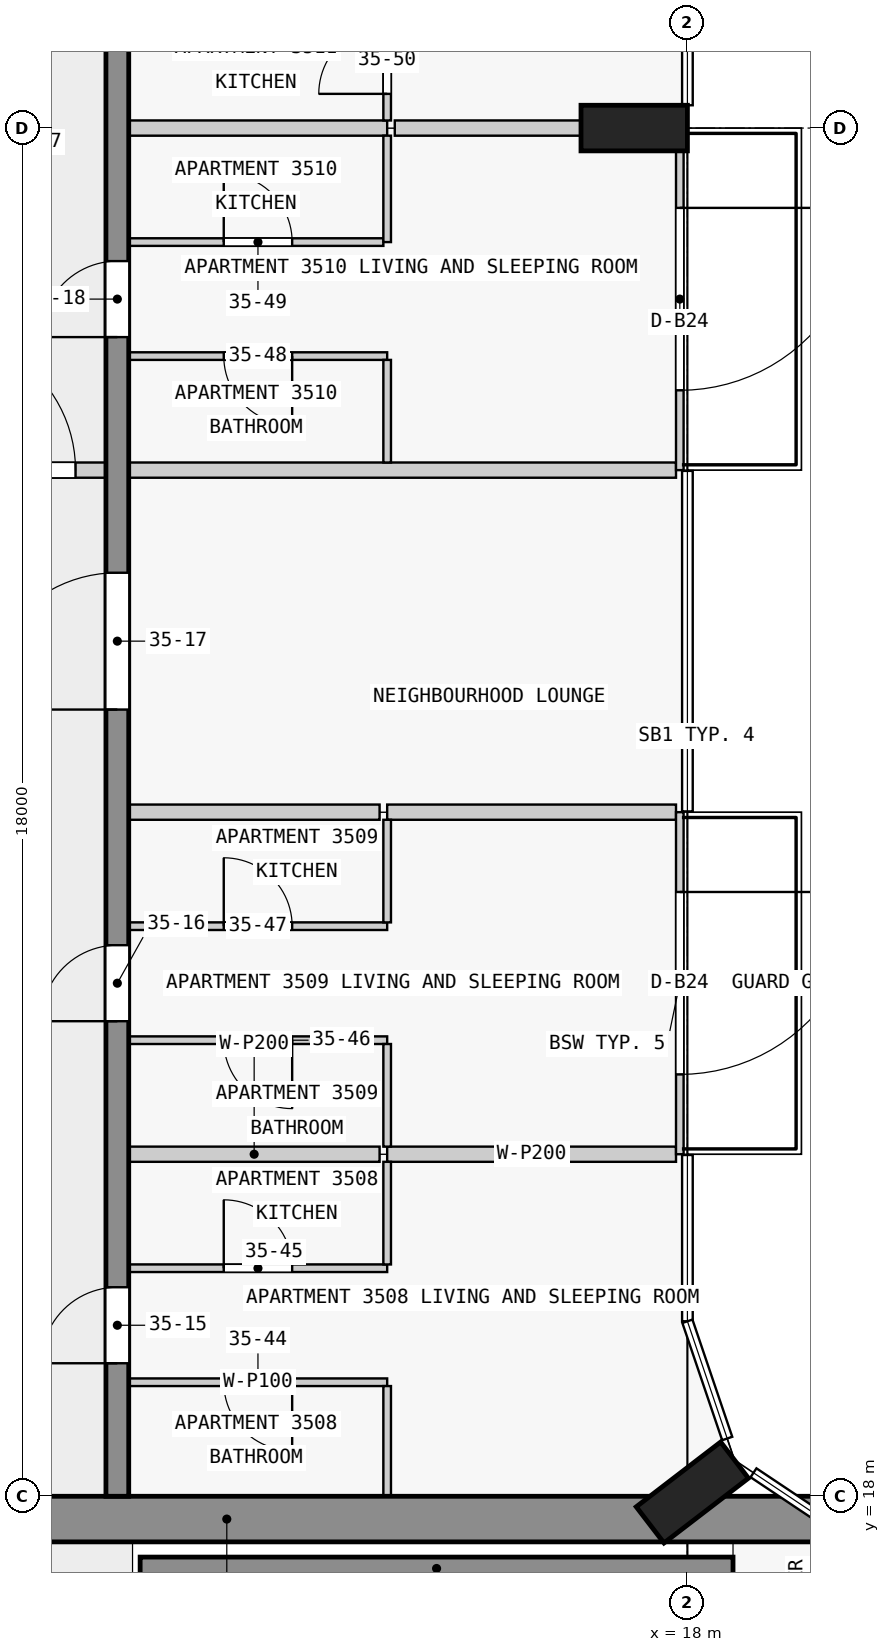
"""IFC4 building model, lengths in metres.
Left out: names, types, materials, properties, quantities, classifications, styles, units other than length and angle.
Written with IfcOpenShell. Run it as: python <this file> out.ifc"""

import sys

from ifc_helpers import new_model, si_unit, direction, frame, frame_2d, origin, origin_2d, place, context, subcontext, project, spatial, rectangle, extrude, element, fill, save


model = new_model("IFC4")
c1 = context("Model", 3, precision=1e-05, world=origin(), true_north=direction((0.0, 1.0)))
c2 = subcontext(c1, "Body", "Model", "MODEL_VIEW")
j1 = project(units=[si_unit("LENGTHUNIT", "METRE"), si_unit("PLANEANGLEUNIT", "RADIAN")], contexts=[c1])
p1 = place(None, origin())
s1 = spatial("IfcSite", under=j1, at=p1, CompositionType="ELEMENT")
p2 = place(p1, origin())
s2 = spatial("IfcBuilding", under=s1, at=p2, CompositionType="ELEMENT")
p3 = place(p2, frame((0.0, 0.0, 139.4)))
s3 = spatial("IfcBuildingStorey", under=s2, at=p3, CompositionType="ELEMENT", Elevation=139.4)
for number, where, z_axis, x_axis in (
    (1, (18.065, 18.05, 0.0), (0.0, 0.0, 1.0), (-0.609, 0.793, 0.0)),
    (2, (17.3, 36.0, 0.0), (0.0, 0.0, 1.0), (0.0, 1.0, 0.0)),
):
    element("IfcColumn", number, at=place(p3, frame(where, z_axis=z_axis, x_axis=x_axis)), inside=s3, PredefinedType="COLUMN", context=c2, shape_type="SweptSolid", body=[
        extrude(rectangle(XDim=0.6, YDim=1.4, at=origin_2d()), origin(), (0.0, 0.0, 1.0), 3.5),
    ])
p4 = place(p3, frame((1.38, 17.7, 0.0), z_axis=(0.0, 0.0, 1.0), x_axis=(1.0, 0.0, 0.0)))
e3 = element("IfcWall", 3, at=p4, inside=s3, PredefinedType="SHEAR", context=c2, shape_type="SweptSolid", body=[
    extrude(rectangle(XDim=21.12, YDim=0.6, at=frame_2d((10.56, 0.0))), origin(), (0.0, 0.0, 1.0), 3.25),
])
p5 = place(p4, frame((6.4, 0.0, 0.0)))
e4 = element("IfcOpeningElement", 4, at=p5, cuts=e3, PredefinedType="OPENING", context=c2, shape_type="SweptSolid", body=[
    extrude(rectangle(XDim=1.8, YDim=2.1, at=frame_2d((0.9, 1.05))), frame((0.0, 0.31, 0.0), z_axis=(0.0, -1.0, 0.0), x_axis=(1.0, 0.0, 0.0)), (0.0, 0.0, 1.0), 0.62),
])
p6 = place(p3, frame((10.8, 17.05, 0.0), z_axis=(0.0, 0.0, 1.0), x_axis=(1.0, 0.0, 0.0)))
e5 = element("IfcWall", 5, at=p6, inside=s3, PredefinedType="SHEAR", context=c2, shape_type="SweptSolid", body=[
    extrude(rectangle(XDim=7.8, YDim=0.3, at=frame_2d((3.9, 0.0))), origin(), (0.0, 0.0, 1.0), 3.25),
])
p7 = place(p3, frame((10.5, 18.0, 0.0), z_axis=(0.0, 0.0, 1.0), x_axis=(0.0, 1.0, 0.0)))
e6 = element("IfcWall", 6, at=p7, inside=s3, PredefinedType="SHEAR", context=c2, shape_type="SweptSolid", body=[
    extrude(rectangle(XDim=27.0, YDim=0.3, at=frame_2d((13.5, 0.0))), origin(), (0.0, 0.0, 1.0), 3.25),
])
p8 = place(p7, frame((1.75, 0.0, 0.0)))
e7 = element("IfcOpeningElement", 7, at=p8, cuts=e6, PredefinedType="OPENING", context=c2, shape_type="SweptSolid", body=[
    extrude(rectangle(XDim=1.0, YDim=2.1, at=frame_2d((0.5, 1.05))), frame((0.0, 0.16, 0.0), z_axis=(0.0, -1.0, 0.0), x_axis=(1.0, 0.0, 0.0)), (0.0, 0.0, 1.0), 0.32),
])
p9 = place(p7, frame((6.25, 0.0, 0.0)))
e8 = element("IfcOpeningElement", 8, at=p9, cuts=e6, PredefinedType="OPENING", context=c2, shape_type="SweptSolid", body=[
    extrude(rectangle(XDim=1.0, YDim=2.1, at=frame_2d((0.5, 1.05))), frame((0.0, 0.16, 0.0), z_axis=(0.0, -1.0, 0.0), x_axis=(1.0, 0.0, 0.0)), (0.0, 0.0, 1.0), 0.32),
])
p10 = place(p7, frame((10.35, 0.0, 0.0)))
e9 = element("IfcOpeningElement", 9, at=p10, cuts=e6, PredefinedType="OPENING", context=c2, shape_type="SweptSolid", body=[
    extrude(rectangle(XDim=1.8, YDim=2.1, at=frame_2d((0.9, 1.05))), frame((0.0, 0.16, 0.0), z_axis=(0.0, -1.0, 0.0), x_axis=(1.0, 0.0, 0.0)), (0.0, 0.0, 1.0), 0.32),
])
p11 = place(p7, frame((15.25, 0.0, 0.0)))
e10 = element("IfcOpeningElement", 10, at=p11, cuts=e6, PredefinedType="OPENING", context=c2, shape_type="SweptSolid", body=[
    extrude(rectangle(XDim=1.0, YDim=2.1, at=frame_2d((0.5, 1.05))), frame((0.0, 0.16, 0.0), z_axis=(0.0, -1.0, 0.0), x_axis=(1.0, 0.0, 0.0)), (0.0, 0.0, 1.0), 0.32),
])
p12 = place(p7, frame((21.35, 0.0, 0.0)))
e11 = element("IfcOpeningElement", 11, at=p12, cuts=e6, PredefinedType="OPENING", context=c2, shape_type="SweptSolid", body=[
    extrude(rectangle(XDim=1.0, YDim=2.1, at=frame_2d((0.5, 1.05))), frame((0.0, 0.16, 0.0), z_axis=(0.0, -1.0, 0.0), x_axis=(1.0, 0.0, 0.0)), (0.0, 0.0, 1.0), 0.32),
])
p13 = place(p3, frame((17.9, 27.0, 0.0), z_axis=(0.0, 0.0, 1.0), x_axis=(0.0, -1.0, 0.0)))
e12 = element("IfcWall", 12, at=p13, inside=s3, PredefinedType="STANDARD", context=c2, shape_type="SweptSolid", body=[
    extrude(rectangle(XDim=4.5, YDim=0.1, at=frame_2d((2.25, 0.0))), origin(), (0.0, 0.0, 1.0), 3.25),
])
p14 = place(p13, frame((1.05, 0.0, 0.0)))
e13 = element("IfcOpeningElement", 13, at=p14, cuts=e12, PredefinedType="OPENING", context=c2, shape_type="SweptSolid", body=[
    extrude(rectangle(XDim=2.4, YDim=2.4, at=frame_2d((1.2, 1.2))), frame((0.0, 0.06, 0.0), z_axis=(0.0, -1.0, 0.0), x_axis=(1.0, 0.0, 0.0)), (0.0, 0.0, 1.0), 0.12),
])
p15 = place(p3, frame((17.9, 36.0, 0.0), z_axis=(0.0, 0.0, 1.0), x_axis=(0.0, -1.0, 0.0)))
e14 = element("IfcWall", 14, at=p15, inside=s3, PredefinedType="STANDARD", context=c2, shape_type="SweptSolid", body=[
    extrude(rectangle(XDim=4.5, YDim=0.1, at=frame_2d((2.25, 0.0))), origin(), (0.0, 0.0, 1.0), 3.25),
])
p16 = place(p15, frame((1.05, 0.0, 0.0)))
e15 = element("IfcOpeningElement", 15, at=p16, cuts=e14, PredefinedType="OPENING", context=c2, shape_type="SweptSolid", body=[
    extrude(rectangle(XDim=2.4, YDim=2.4, at=frame_2d((1.2, 1.2))), frame((0.0, 0.06, 0.0), z_axis=(0.0, -1.0, 0.0), x_axis=(1.0, 0.0, 0.0)), (0.0, 0.0, 1.0), 0.12),
])
p17 = place(p3, frame((14.05, 19.5, 0.0), z_axis=(0.0, 0.0, 1.0), x_axis=(-1.0, 0.0, 0.0)))
e16 = element("IfcWall", 16, at=p17, inside=s3, PredefinedType="PARTITIONING", context=c2, shape_type="SweptSolid", body=[
    extrude(rectangle(XDim=3.4, YDim=0.1, at=frame_2d((1.7, 0.0))), origin(), (0.0, 0.0, 1.0), 3.25),
])
p18 = place(p17, frame((1.25, 0.0, 0.0)))
e17 = element("IfcOpeningElement", 17, at=p18, cuts=e16, PredefinedType="OPENING", context=c2, shape_type="SweptSolid", body=[
    extrude(rectangle(XDim=0.9, YDim=2.1, at=frame_2d((0.45, 1.05))), frame((0.0, 0.06, 0.0), z_axis=(0.0, -1.0, 0.0), x_axis=(1.0, 0.0, 0.0)), (0.0, 0.0, 1.0), 0.12),
])
p19 = place(p3, frame((10.65, 21.0, 0.0), z_axis=(0.0, 0.0, 1.0), x_axis=(1.0, 0.0, 0.0)))
e18 = element("IfcWall", 18, at=p19, inside=s3, PredefinedType="PARTITIONING", context=c2, shape_type="SweptSolid", body=[
    extrude(rectangle(XDim=3.4, YDim=0.1, at=frame_2d((1.7, 0.0))), origin(), (0.0, 0.0, 1.0), 3.25),
])
p20 = place(p19, frame((1.25, 0.0, 0.0)))
e19 = element("IfcOpeningElement", 19, at=p20, cuts=e18, PredefinedType="OPENING", context=c2, shape_type="SweptSolid", body=[
    extrude(rectangle(XDim=0.9, YDim=2.1, at=frame_2d((0.45, 1.05))), frame((0.0, 0.06, 0.0), z_axis=(0.0, -1.0, 0.0), x_axis=(1.0, 0.0, 0.0)), (0.0, 0.0, 1.0), 0.12),
])
p21 = place(p3, frame((13.95, 22.5, 0.0), z_axis=(0.0, 0.0, 1.0), x_axis=(-1.0, 0.0, 0.0)))
e20 = element("IfcWall", 20, at=p21, inside=s3, PredefinedType="PARTITIONING", context=c2, shape_type="SweptSolid", body=[
    extrude(rectangle(XDim=3.3, YDim=0.2, at=frame_2d((1.65, 0.0))), origin(), (0.0, 0.0, 1.0), 3.25),
])
p22 = place(p3, frame((14.05, 22.5, 0.0), z_axis=(0.0, 0.0, 1.0), x_axis=(1.0, 0.0, 0.0)))
e21 = element("IfcWall", 21, at=p22, inside=s3, PredefinedType="PARTITIONING", context=c2, shape_type="SweptSolid", body=[
    extrude(rectangle(XDim=3.8, YDim=0.2, at=frame_2d((1.9, 0.0))), origin(), (0.0, 0.0, 1.0), 3.25),
])
p23 = place(p3, frame((14.05, 24.0, 0.0), z_axis=(0.0, 0.0, 1.0), x_axis=(-1.0, 0.0, 0.0)))
e22 = element("IfcWall", 22, at=p23, inside=s3, PredefinedType="PARTITIONING", context=c2, shape_type="SweptSolid", body=[
    extrude(rectangle(XDim=3.4, YDim=0.1, at=frame_2d((1.7, 0.0))), origin(), (0.0, 0.0, 1.0), 3.25),
])
p24 = place(p23, frame((1.25, 0.0, 0.0)))
e23 = element("IfcOpeningElement", 23, at=p24, cuts=e22, PredefinedType="OPENING", context=c2, shape_type="SweptSolid", body=[
    extrude(rectangle(XDim=0.9, YDim=2.1, at=frame_2d((0.45, 1.05))), frame((0.0, 0.06, 0.0), z_axis=(0.0, -1.0, 0.0), x_axis=(1.0, 0.0, 0.0)), (0.0, 0.0, 1.0), 0.12),
])
p25 = place(p3, frame((10.65, 25.5, 0.0), z_axis=(0.0, 0.0, 1.0), x_axis=(1.0, 0.0, 0.0)))
e24 = element("IfcWall", 24, at=p25, inside=s3, PredefinedType="PARTITIONING", context=c2, shape_type="SweptSolid", body=[
    extrude(rectangle(XDim=3.4, YDim=0.1, at=frame_2d((1.7, 0.0))), origin(), (0.0, 0.0, 1.0), 3.25),
])
p26 = place(p25, frame((1.25, 0.0, 0.0)))
e25 = element("IfcOpeningElement", 25, at=p26, cuts=e24, PredefinedType="OPENING", context=c2, shape_type="SweptSolid", body=[
    extrude(rectangle(XDim=0.9, YDim=2.1, at=frame_2d((0.45, 1.05))), frame((0.0, 0.06, 0.0), z_axis=(0.0, -1.0, 0.0), x_axis=(1.0, 0.0, 0.0)), (0.0, 0.0, 1.0), 0.12),
])
p27 = place(p3, frame((13.95, 27.0, 0.0), z_axis=(0.0, 0.0, 1.0), x_axis=(-1.0, 0.0, 0.0)))
e26 = element("IfcWall", 26, at=p27, inside=s3, PredefinedType="PARTITIONING", context=c2, shape_type="SweptSolid", body=[
    extrude(rectangle(XDim=3.3, YDim=0.2, at=frame_2d((1.65, 0.0))), origin(), (0.0, 0.0, 1.0), 3.25),
])
p28 = place(p3, frame((14.05, 27.0, 0.0), z_axis=(0.0, 0.0, 1.0), x_axis=(1.0, 0.0, 0.0)))
e27 = element("IfcWall", 27, at=p28, inside=s3, PredefinedType="PARTITIONING", context=c2, shape_type="SweptSolid", body=[
    extrude(rectangle(XDim=3.8, YDim=0.2, at=frame_2d((1.9, 0.0))), origin(), (0.0, 0.0, 1.0), 3.25),
])
p29 = place(p3, frame((17.85, 31.5, 0.0), z_axis=(0.0, 0.0, 1.0), x_axis=(-1.0, 0.0, 0.0)))
e28 = element("IfcWall", 28, at=p29, inside=s3, PredefinedType="PARTITIONING", context=c2, shape_type="SweptSolid", body=[
    extrude(rectangle(XDim=7.2, YDim=0.2, at=frame_2d((3.6, 0.0))), origin(), (0.0, 0.0, 1.0), 3.25),
])
p30 = place(p3, frame((14.05, 33.0, 0.0), z_axis=(0.0, 0.0, 1.0), x_axis=(-1.0, 0.0, 0.0)))
e29 = element("IfcWall", 29, at=p30, inside=s3, PredefinedType="PARTITIONING", context=c2, shape_type="SweptSolid", body=[
    extrude(rectangle(XDim=3.4, YDim=0.1, at=frame_2d((1.7, 0.0))), origin(), (0.0, 0.0, 1.0), 3.25),
])
p31 = place(p30, frame((1.25, 0.0, 0.0)))
e30 = element("IfcOpeningElement", 30, at=p31, cuts=e29, PredefinedType="OPENING", context=c2, shape_type="SweptSolid", body=[
    extrude(rectangle(XDim=0.9, YDim=2.1, at=frame_2d((0.45, 1.05))), frame((0.0, 0.06, 0.0), z_axis=(0.0, -1.0, 0.0), x_axis=(1.0, 0.0, 0.0)), (0.0, 0.0, 1.0), 0.12),
])
p32 = place(p3, frame((10.65, 34.5, 0.0), z_axis=(0.0, 0.0, 1.0), x_axis=(1.0, 0.0, 0.0)))
e31 = element("IfcWall", 31, at=p32, inside=s3, PredefinedType="PARTITIONING", context=c2, shape_type="SweptSolid", body=[
    extrude(rectangle(XDim=3.35, YDim=0.1, at=frame_2d((1.675, 0.0))), origin(), (0.0, 0.0, 1.0), 3.25),
])
p33 = place(p32, frame((1.25, 0.0, 0.0)))
e32 = element("IfcOpeningElement", 32, at=p33, cuts=e31, PredefinedType="OPENING", context=c2, shape_type="SweptSolid", body=[
    extrude(rectangle(XDim=0.9, YDim=2.1, at=frame_2d((0.45, 1.05))), frame((0.0, 0.06, 0.0), z_axis=(0.0, -1.0, 0.0), x_axis=(1.0, 0.0, 0.0)), (0.0, 0.0, 1.0), 0.12),
])
p34 = place(p3, frame((14.05, 36.0, 0.0), z_axis=(0.0, 0.0, 1.0), x_axis=(-1.0, 0.0, 0.0)))
e33 = element("IfcWall", 33, at=p34, inside=s3, PredefinedType="PARTITIONING", context=c2, shape_type="SweptSolid", body=[
    extrude(rectangle(XDim=3.4, YDim=0.2, at=frame_2d((1.7, 0.0))), origin(), (0.0, 0.0, 1.0), 3.25),
])
p35 = place(p3, frame((14.15, 36.0, 0.0), z_axis=(0.0, 0.0, 1.0), x_axis=(1.0, 0.0, 0.0)))
e34 = element("IfcWall", 34, at=p35, inside=s3, PredefinedType="PARTITIONING", context=c2, shape_type="SweptSolid", body=[
    extrude(rectangle(XDim=2.45, YDim=0.2, at=frame_2d((1.225, 0.0))), origin(), (0.0, 0.0, 1.0), 3.25),
])
p36 = place(p3, frame((14.05, 18.0, 0.0), z_axis=(0.0, 0.0, 1.0), x_axis=(0.0, 1.0, 0.0)))
e35 = element("IfcWall", 35, at=p36, inside=s3, PredefinedType="PARTITIONING", context=c2, shape_type="SweptSolid", body=[
    extrude(rectangle(XDim=1.45, YDim=0.1, at=frame_2d((0.725, 0.0))), origin(), (0.0, 0.0, 1.0), 3.25),
])
for number, where, z_axis, x_axis in (
    (36, (14.05, 21.05, 0.0), (0.0, 0.0, 1.0), (0.0, 1.0, 0.0)),
    (37, (14.05, 22.6, 0.0), (0.0, 0.0, 1.0), (0.0, 1.0, 0.0)),
    (38, (14.05, 25.55, 0.0), (0.0, 0.0, 1.0), (0.0, 1.0, 0.0)),
    (39, (14.05, 31.6, 0.0), (0.0, 0.0, 1.0), (0.0, 1.0, 0.0)),
):
    element("IfcWall", number, at=place(p3, frame(where, z_axis=z_axis, x_axis=x_axis)), inside=s3, PredefinedType="PARTITIONING", context=c2, shape_type="SweptSolid", body=[
        extrude(rectangle(XDim=1.35, YDim=0.1, at=frame_2d((0.675, 0.0))), origin(), (0.0, 0.0, 1.0), 3.25),
    ])
p37 = place(p3, frame((14.05, 34.5, 0.0), z_axis=(0.0, 0.0, 1.0), x_axis=(0.0, 1.0, 0.0)))
e40 = element("IfcWall", 40, at=p37, inside=s3, PredefinedType="PARTITIONING", context=c2, shape_type="SweptSolid", body=[
    extrude(rectangle(XDim=1.4, YDim=0.1, at=frame_2d((0.7, 0.0))), origin(), (0.0, 0.0, 1.0), 3.25),
])
p38 = place(p3, frame((14.05, 36.1, 0.0), z_axis=(0.0, 0.0, 1.0), x_axis=(0.0, 1.0, 0.0)))
e41 = element("IfcWall", 41, at=p38, inside=s3, PredefinedType="PARTITIONING", context=c2, shape_type="SweptSolid", body=[
    extrude(rectangle(XDim=3.0, YDim=0.1, at=frame_2d((1.5, 0.0))), origin(), (0.0, 0.0, 1.0), 3.25),
])
p39 = place(p38, frame((0.35, 0.0, 0.0)))
e42 = element("IfcOpeningElement", 42, at=p39, cuts=e41, PredefinedType="OPENING", context=c2, shape_type="SweptSolid", body=[
    extrude(rectangle(XDim=0.9, YDim=2.1, at=frame_2d((0.45, 1.05))), frame((0.0, 0.06, 0.0), z_axis=(0.0, -1.0, 0.0), x_axis=(1.0, 0.0, 0.0)), (0.0, 0.0, 1.0), 0.12),
])
p40 = place(p3, frame((7.45, 31.5, 0.0), z_axis=(0.0, 0.0, 1.0), x_axis=(1.0, 0.0, 0.0)))
e43 = element("IfcWall", 43, at=p40, inside=s3, PredefinedType="PARTITIONING", context=c2, shape_type="SweptSolid", body=[
    extrude(rectangle(XDim=3.1, YDim=0.2, at=frame_2d((1.55, 0.0))), origin(), (0.0, 0.0, 1.0), 3.25),
])
p41 = place(p40, frame((0.7, 0.0, 0.0)))
e44 = element("IfcOpeningElement", 44, at=p41, cuts=e43, PredefinedType="OPENING", context=c2, shape_type="SweptSolid", body=[
    extrude(rectangle(XDim=1.8, YDim=2.1, at=frame_2d((0.9, 1.05))), frame((0.0, 0.11, 0.0), z_axis=(0.0, -1.0, 0.0), x_axis=(1.0, 0.0, 0.0)), (0.0, 0.0, 1.0), 0.22),
])
p42 = place(p14, origin())
e45 = element("IfcDoor", 45, at=p42, inside=s3, OperationType="SINGLE_SWING_LEFT", PredefinedType="DOOR", context=c2, shape_type="SweptSolid", body=[
    extrude(rectangle(XDim=2.4, YDim=2.4, at=frame_2d((1.2, 1.2))), frame((0.0, 0.025, 0.0), z_axis=(0.0, -1.0, 0.0), x_axis=(1.0, 0.0, 0.0)), (0.0, 0.0, 1.0), 0.05),
])
fill(e13, e45)
p43 = place(p16, origin())
e46 = element("IfcDoor", 46, at=p43, inside=s3, OperationType="SINGLE_SWING_LEFT", PredefinedType="DOOR", context=c2, shape_type="SweptSolid", body=[
    extrude(rectangle(XDim=2.4, YDim=2.4, at=frame_2d((1.2, 1.2))), frame((0.0, 0.025, 0.0), z_axis=(0.0, -1.0, 0.0), x_axis=(1.0, 0.0, 0.0)), (0.0, 0.0, 1.0), 0.05),
])
fill(e15, e46)
p44 = place(p8, origin())
e47 = element("IfcDoor", 47, at=p44, inside=s3, OperationType="SINGLE_SWING_LEFT", PredefinedType="DOOR", context=c2, shape_type="SweptSolid", body=[
    extrude(rectangle(XDim=1.0, YDim=2.1, at=frame_2d((0.5, 1.05))), frame((0.0, 0.025, 0.0), z_axis=(0.0, -1.0, 0.0), x_axis=(1.0, 0.0, 0.0)), (0.0, 0.0, 1.0), 0.05),
])
fill(e7, e47)
p45 = place(p9, origin())
e48 = element("IfcDoor", 48, at=p45, inside=s3, OperationType="SINGLE_SWING_LEFT", PredefinedType="DOOR", context=c2, shape_type="SweptSolid", body=[
    extrude(rectangle(XDim=1.0, YDim=2.1, at=frame_2d((0.5, 1.05))), frame((0.0, 0.025, 0.0), z_axis=(0.0, -1.0, 0.0), x_axis=(1.0, 0.0, 0.0)), (0.0, 0.0, 1.0), 0.05),
])
fill(e8, e48)
p46 = place(p10, origin())
e49 = element("IfcDoor", 49, at=p46, inside=s3, OperationType="SINGLE_SWING_LEFT", PredefinedType="DOOR", context=c2, shape_type="SweptSolid", body=[
    extrude(rectangle(XDim=1.8, YDim=2.1, at=frame_2d((0.9, 1.05))), frame((0.0, 0.025, 0.0), z_axis=(0.0, -1.0, 0.0), x_axis=(1.0, 0.0, 0.0)), (0.0, 0.0, 1.0), 0.05),
])
fill(e9, e49)
p47 = place(p11, origin())
e50 = element("IfcDoor", 50, at=p47, inside=s3, OperationType="SINGLE_SWING_RIGHT", PredefinedType="DOOR", context=c2, shape_type="SweptSolid", body=[
    extrude(rectangle(XDim=1.0, YDim=2.1, at=frame_2d((0.5, 1.05))), frame((0.0, 0.025, 0.0), z_axis=(0.0, -1.0, 0.0), x_axis=(1.0, 0.0, 0.0)), (0.0, 0.0, 1.0), 0.05),
])
fill(e10, e50)
p48 = place(p41, origin())
e51 = element("IfcDoor", 51, at=p48, inside=s3, OperationType="SINGLE_SWING_RIGHT", PredefinedType="DOOR", context=c2, shape_type="SweptSolid", body=[
    extrude(rectangle(XDim=1.8, YDim=2.1, at=frame_2d((0.9, 1.05))), frame((0.0, 0.025, 0.0), z_axis=(0.0, -1.0, 0.0), x_axis=(1.0, 0.0, 0.0)), (0.0, 0.0, 1.0), 0.05),
])
fill(e44, e51)
p49 = place(p18, origin())
e52 = element("IfcDoor", 52, at=p49, inside=s3, OperationType="SINGLE_SWING_LEFT", PredefinedType="DOOR", context=c2, shape_type="SweptSolid", body=[
    extrude(rectangle(XDim=0.9, YDim=2.1, at=frame_2d((0.45, 1.05))), frame((0.0, 0.025, 0.0), z_axis=(0.0, -1.0, 0.0), x_axis=(1.0, 0.0, 0.0)), (0.0, 0.0, 1.0), 0.05),
])
fill(e17, e52)
p50 = place(p20, origin())
e53 = element("IfcDoor", 53, at=p50, inside=s3, OperationType="SINGLE_SWING_LEFT", PredefinedType="DOOR", context=c2, shape_type="SweptSolid", body=[
    extrude(rectangle(XDim=0.9, YDim=2.1, at=frame_2d((0.45, 1.05))), frame((0.0, 0.025, 0.0), z_axis=(0.0, -1.0, 0.0), x_axis=(1.0, 0.0, 0.0)), (0.0, 0.0, 1.0), 0.05),
])
fill(e19, e53)
p51 = place(p24, origin())
e54 = element("IfcDoor", 54, at=p51, inside=s3, OperationType="SINGLE_SWING_LEFT", PredefinedType="DOOR", context=c2, shape_type="SweptSolid", body=[
    extrude(rectangle(XDim=0.9, YDim=2.1, at=frame_2d((0.45, 1.05))), frame((0.0, 0.025, 0.0), z_axis=(0.0, -1.0, 0.0), x_axis=(1.0, 0.0, 0.0)), (0.0, 0.0, 1.0), 0.05),
])
fill(e23, e54)
p52 = place(p26, origin())
e55 = element("IfcDoor", 55, at=p52, inside=s3, OperationType="SINGLE_SWING_LEFT", PredefinedType="DOOR", context=c2, shape_type="SweptSolid", body=[
    extrude(rectangle(XDim=0.9, YDim=2.1, at=frame_2d((0.45, 1.05))), frame((0.0, 0.025, 0.0), z_axis=(0.0, -1.0, 0.0), x_axis=(1.0, 0.0, 0.0)), (0.0, 0.0, 1.0), 0.05),
])
fill(e25, e55)
p53 = place(p31, origin())
e56 = element("IfcDoor", 56, at=p53, inside=s3, OperationType="SINGLE_SWING_LEFT", PredefinedType="DOOR", context=c2, shape_type="SweptSolid", body=[
    extrude(rectangle(XDim=0.9, YDim=2.1, at=frame_2d((0.45, 1.05))), frame((0.0, 0.025, 0.0), z_axis=(0.0, -1.0, 0.0), x_axis=(1.0, 0.0, 0.0)), (0.0, 0.0, 1.0), 0.05),
])
fill(e30, e56)
p54 = place(p33, origin())
e57 = element("IfcDoor", 57, at=p54, inside=s3, OperationType="SINGLE_SWING_RIGHT", PredefinedType="DOOR", context=c2, shape_type="SweptSolid", body=[
    extrude(rectangle(XDim=0.9, YDim=2.1, at=frame_2d((0.45, 1.05))), frame((0.0, 0.025, 0.0), z_axis=(0.0, -1.0, 0.0), x_axis=(1.0, 0.0, 0.0)), (0.0, 0.0, 1.0), 0.05),
])
fill(e32, e57)
p55 = place(p39, origin())
e58 = element("IfcDoor", 58, at=p55, inside=s3, OperationType="SINGLE_SWING_LEFT", PredefinedType="DOOR", context=c2, shape_type="SweptSolid", body=[
    extrude(rectangle(XDim=0.9, YDim=2.1, at=frame_2d((0.45, 1.05))), frame((0.0, 0.025, 0.0), z_axis=(0.0, -1.0, 0.0), x_axis=(1.0, 0.0, 0.0)), (0.0, 0.0, 1.0), 0.05),
])
fill(e42, e58)
save(model, sys.argv[1])
